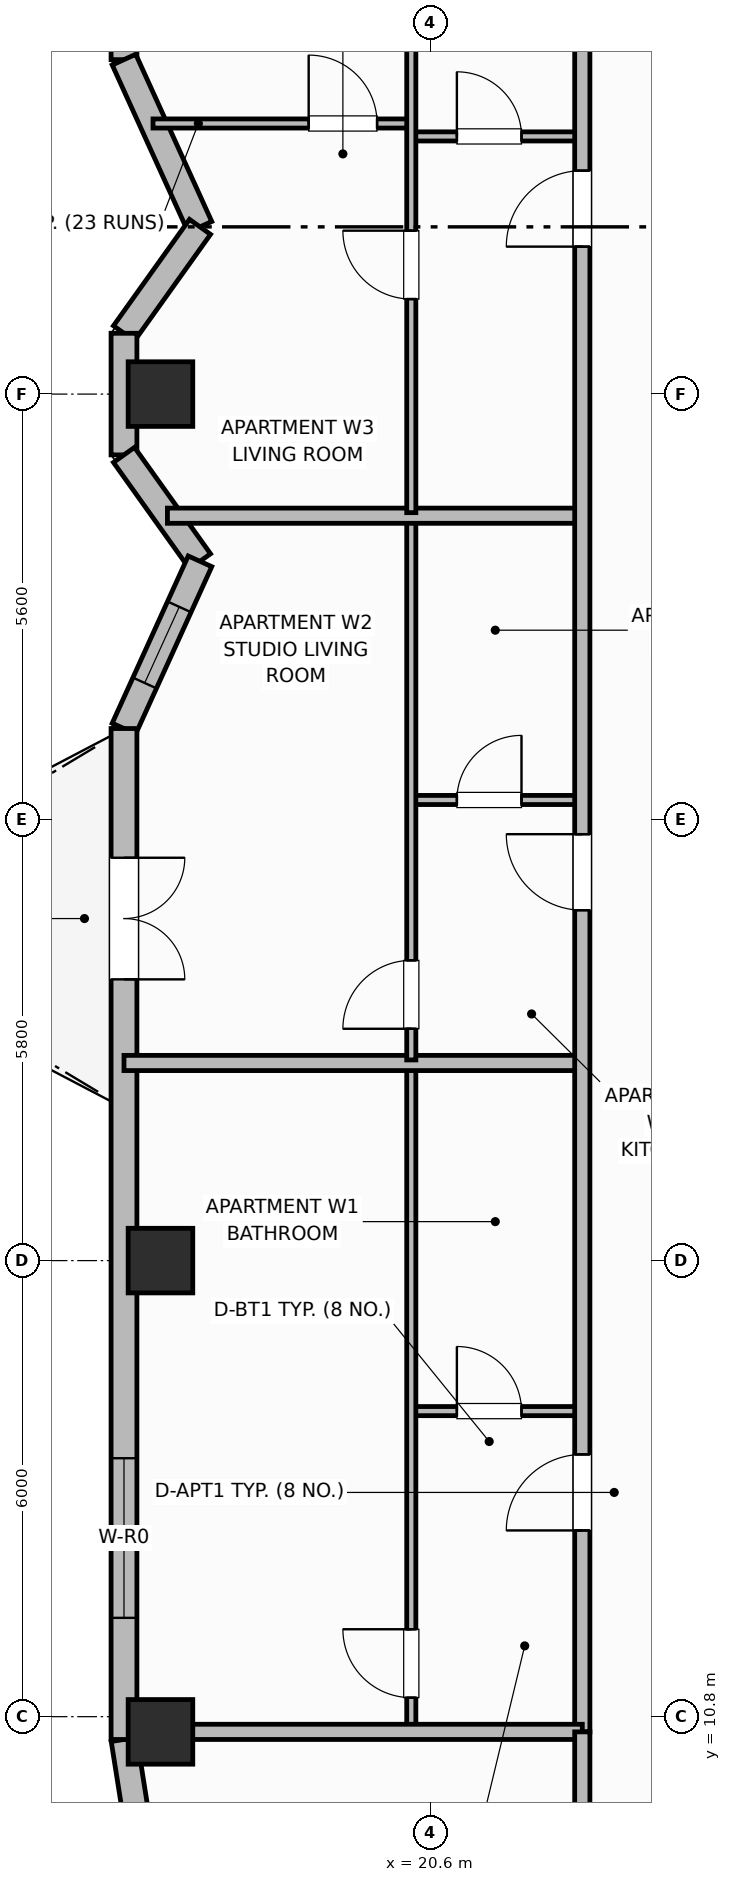
"""IFC4 building model, lengths in metres.
Left out: names, types, materials, properties, quantities, classifications, styles, units other than length and angle.
Written with IfcOpenShell. Run it as: python <this file> out.ifc"""

import sys

from ifc_helpers import new_model, si_unit, direction, frame, frame_2d, origin, origin_2d, place, context, subcontext, project, spatial, rectangle, extrude, element, fill, save


model = new_model("IFC4")
c1 = context("Model", 3, precision=1e-05, world=origin(), true_north=direction((0.0, 1.0)))
c2 = subcontext(c1, "Body", "Model", "MODEL_VIEW")
j1 = project(units=[si_unit("LENGTHUNIT", "METRE"), si_unit("PLANEANGLEUNIT", "RADIAN")], contexts=[c1])
p1 = place(None, origin())
s1 = spatial("IfcSite", under=j1, at=p1, CompositionType="ELEMENT")
p2 = place(p1, origin())
s2 = spatial("IfcBuilding", under=s1, at=p2, CompositionType="ELEMENT")
p3 = place(p2, frame((0.0, 0.0, 218.4)))
s3 = spatial("IfcBuildingStorey", under=s2, at=p3, CompositionType="ELEMENT", Elevation=218.4)
for number, where, z_axis, x_axis in (
    (1, (17.05, 10.6, 0.0), (0.0, 0.0, 1.0), (1.0, 0.0, 0.0)),
    (2, (17.05, 16.8, 0.0), (0.0, 0.0, 1.0), (1.0, 0.0, 0.0)),
    (3, (17.05, 28.2, 0.0), (0.0, 0.0, 1.0), (1.0, 0.0, 0.0)),
):
    element("IfcColumn", number, at=place(p3, frame(where, z_axis=z_axis, x_axis=x_axis)), inside=s3, PredefinedType="COLUMN", context=c2, shape_type="SweptSolid", body=[
        extrude(rectangle(XDim=0.85, YDim=0.85, at=origin_2d()), origin(), (0.0, 0.0, 1.0), 3.7),
    ])
p4 = place(p3, frame((16.57, 10.5, 0.0), z_axis=(0.0, 0.0, 1.0), x_axis=(0.156514556949, -0.987675651954, 0.0)))
e4 = element("IfcWall", 4, at=p4, inside=s3, PredefinedType="SOLIDWALL", context=c2, shape_type="SweptSolid", body=[
    extrude(rectangle(XDim=1.135, YDim=0.34, at=frame_2d((0.568, 0.0))), origin(), (0.0, 0.0, 1.0), 2.72),
])
p5 = place(p3, frame((16.57, 45.9, 0.0), z_axis=(0.0, 0.0, 1.0), x_axis=(0.0, -1.0, 0.0)))
e5 = element("IfcWall", 5, at=p5, inside=s3, PredefinedType="SOLIDWALL", context=c2, shape_type="SweptSolid", body=[
    extrude(rectangle(XDim=13.3, YDim=0.34, at=frame_2d((6.65, 0.0))), origin(), (0.0, 0.0, 1.0), 2.72),
])
p6 = place(p5, frame((1.6, 0.0, 0.95)))
e6 = element("IfcOpeningElement", 6, at=p6, cuts=e5, PredefinedType="OPENING", context=c2, shape_type="SweptSolid", body=[
    extrude(rectangle(XDim=1.1, YDim=1.65, at=frame_2d((0.55, 0.825))), frame((0.0, 0.18, 0.0), z_axis=(0.0, -1.0, 0.0), x_axis=(1.0, 0.0, 0.0)), (0.0, 0.0, 1.0), 0.36),
])
p7 = place(p5, frame((3.9, 0.0, 0.95)))
e7 = element("IfcOpeningElement", 7, at=p7, cuts=e5, PredefinedType="OPENING", context=c2, shape_type="SweptSolid", body=[
    extrude(rectangle(XDim=1.1, YDim=1.65, at=frame_2d((0.55, 0.825))), frame((0.0, 0.18, 0.0), z_axis=(0.0, -1.0, 0.0), x_axis=(1.0, 0.0, 0.0)), (0.0, 0.0, 1.0), 0.36),
])
p8 = place(p5, frame((10.6, 0.0, 0.95)))
e8 = element("IfcOpeningElement", 8, at=p8, cuts=e5, PredefinedType="OPENING", context=c2, shape_type="SweptSolid", body=[
    extrude(rectangle(XDim=1.1, YDim=1.65, at=frame_2d((0.55, 0.825))), frame((0.0, 0.18, 0.0), z_axis=(0.0, -1.0, 0.0), x_axis=(1.0, 0.0, 0.0)), (0.0, 0.0, 1.0), 0.36),
])
p9 = place(p3, frame((16.57, 32.6, 0.0), z_axis=(0.0, 0.0, 1.0), x_axis=(0.413772500085, -0.910380315128, 0.0)))
e9 = element("IfcWall", 9, at=p9, inside=s3, PredefinedType="SOLIDWALL", context=c2, shape_type="SweptSolid", body=[
    extrude(rectangle(XDim=2.417, YDim=0.34, at=frame_2d((1.208, 0.0))), origin(), (0.0, 0.0, 1.0), 2.72),
])
p10 = place(p3, frame((17.57, 30.4, 0.0), z_axis=(0.0, 0.0, 1.0), x_axis=(-0.581265041318, -0.813714293681, 0.0)))
e10 = element("IfcWall", 10, at=p10, inside=s3, PredefinedType="SOLIDWALL", context=c2, shape_type="SweptSolid", body=[
    extrude(rectangle(XDim=1.72, YDim=0.34, at=frame_2d((0.86, 0.0))), origin(), (0.0, 0.0, 1.0), 2.72),
])
p11 = place(p3, frame((16.57, 29.0, 0.0), z_axis=(0.0, 0.0, 1.0), x_axis=(0.0, -1.0, 0.0)))
e11 = element("IfcWall", 11, at=p11, inside=s3, PredefinedType="SOLIDWALL", context=c2, shape_type="SweptSolid", body=[
    extrude(rectangle(XDim=1.6, YDim=0.34, at=frame_2d((0.8, 0.0))), origin(), (0.0, 0.0, 1.0), 2.72),
])
p12 = place(p3, frame((16.57, 27.4, 0.0), z_axis=(0.0, 0.0, 1.0), x_axis=(0.581265041318, -0.813714293681, 0.0)))
e12 = element("IfcWall", 12, at=p12, inside=s3, PredefinedType="SOLIDWALL", context=c2, shape_type="SweptSolid", body=[
    extrude(rectangle(XDim=1.72, YDim=0.34, at=frame_2d((0.86, 0.0))), origin(), (0.0, 0.0, 1.0), 2.72),
])
p13 = place(p3, frame((17.57, 26.0, 0.0), z_axis=(0.0, 0.0, 1.0), x_axis=(-0.413810555983, -0.910363017569, 0.0)))
e13 = element("IfcWall", 13, at=p13, inside=s3, PredefinedType="SOLIDWALL", context=c2, shape_type="SweptSolid", body=[
    extrude(rectangle(XDim=2.417, YDim=0.34, at=frame_2d((1.208, 0.0))), origin(), (0.0, 0.0, 1.0), 2.72),
])
p14 = place(p13, frame((0.658, 0.0, 0.91)))
e14 = element("IfcOpeningElement", 14, at=p14, cuts=e13, PredefinedType="OPENING", context=c2, shape_type="SweptSolid", body=[
    extrude(rectangle(XDim=1.1, YDim=1.65, at=frame_2d((0.55, 0.825))), frame((0.0, 0.18, 0.0), z_axis=(0.0, -1.0, 0.0), x_axis=(1.0, 0.0, 0.0)), (0.0, 0.0, 1.0), 0.36),
])
p15 = place(p3, frame((16.57, 23.8, 0.0), z_axis=(0.0, 0.0, 1.0), x_axis=(0.0, -1.0, 0.0)))
e15 = element("IfcWall", 15, at=p15, inside=s3, PredefinedType="SOLIDWALL", context=c2, shape_type="SweptSolid", body=[
    extrude(rectangle(XDim=13.3, YDim=0.34, at=frame_2d((6.65, 0.0))), origin(), (0.0, 0.0, 1.0), 2.72),
])
p16 = place(p15, frame((1.7, 0.0, 0.0)))
e16 = element("IfcOpeningElement", 16, at=p16, cuts=e15, PredefinedType="OPENING", context=c2, shape_type="SweptSolid", body=[
    extrude(rectangle(XDim=1.6, YDim=2.1, at=frame_2d((0.8, 1.05))), frame((0.0, 0.18, 0.0), z_axis=(0.0, -1.0, 0.0), x_axis=(1.0, 0.0, 0.0)), (0.0, 0.0, 1.0), 0.36),
])
p17 = place(p15, frame((9.6, 0.0, 0.7)))
e17 = element("IfcOpeningElement", 17, at=p17, cuts=e15, PredefinedType="OPENING", context=c2, shape_type="SweptSolid", body=[
    extrude(rectangle(XDim=2.1, YDim=1.9, at=frame_2d((1.05, 0.95))), frame((0.0, 0.18, 0.0), z_axis=(0.0, -1.0, 0.0), x_axis=(1.0, 0.0, 0.0)), (0.0, 0.0, 1.0), 0.36),
])
p18 = place(p3, frame((20.35, 14.82, 0.0), z_axis=(0.0, 0.0, 1.0), x_axis=(1.0, 0.0, 0.0)))
e18 = element("IfcWall", 18, at=p18, inside=s3, PredefinedType="PARTITIONING", context=c2, shape_type="SweptSolid", body=[
    extrude(rectangle(XDim=2.25, YDim=0.12, at=frame_2d((1.125, 0.0))), origin(), (0.0, 0.0, 1.0), 2.55),
])
p19 = place(p18, frame((0.6, 0.0, 0.0)))
e19 = element("IfcOpeningElement", 19, at=p19, cuts=e18, PredefinedType="OPENING", context=c2, shape_type="SweptSolid", body=[
    extrude(rectangle(XDim=0.85, YDim=2.1, at=frame_2d((0.425, 1.05))), frame((0.0, 0.07, 0.0), z_axis=(0.0, -1.0, 0.0), x_axis=(1.0, 0.0, 0.0)), (0.0, 0.0, 1.0), 0.14),
])
p20 = place(p3, frame((20.35, 10.64, 0.0), z_axis=(0.0, 0.0, 1.0), x_axis=(0.0, 1.0, 0.0)))
e20 = element("IfcWall", 20, at=p20, inside=s3, PredefinedType="PARTITIONING", context=c2, shape_type="SweptSolid", body=[
    extrude(rectangle(XDim=8.72, YDim=0.12, at=frame_2d((4.36, 0.0))), origin(), (0.0, 0.0, 1.0), 2.55),
])
p21 = place(p20, frame((0.41, 0.0, 0.0)))
e21 = element("IfcOpeningElement", 21, at=p21, cuts=e20, PredefinedType="OPENING", context=c2, shape_type="SweptSolid", body=[
    extrude(rectangle(XDim=0.9, YDim=2.1, at=frame_2d((0.45, 1.05))), frame((0.0, 0.07, 0.0), z_axis=(0.0, -1.0, 0.0), x_axis=(1.0, 0.0, 0.0)), (0.0, 0.0, 1.0), 0.14),
])
p22 = place(p3, frame((16.57, 19.4, 0.0), z_axis=(0.0, 0.0, 1.0), x_axis=(1.0, 0.0, 0.0)))
e22 = element("IfcWall", 22, at=p22, inside=s3, PredefinedType="PARTITIONING", context=c2, shape_type="SweptSolid", body=[
    extrude(rectangle(XDim=6.03, YDim=0.2, at=frame_2d((3.015, 0.0))), origin(), (0.0, 0.0, 1.0), 2.55),
])
p23 = place(p3, frame((20.35, 22.86, 0.0), z_axis=(0.0, 0.0, 1.0), x_axis=(1.0, 0.0, 0.0)))
e23 = element("IfcWall", 23, at=p23, inside=s3, PredefinedType="PARTITIONING", context=c2, shape_type="SweptSolid", body=[
    extrude(rectangle(XDim=2.25, YDim=0.12, at=frame_2d((1.125, 0.0))), origin(), (0.0, 0.0, 1.0), 2.55),
])
p24 = place(p23, frame((0.6, 0.0, 0.0)))
e24 = element("IfcOpeningElement", 24, at=p24, cuts=e23, PredefinedType="OPENING", context=c2, shape_type="SweptSolid", body=[
    extrude(rectangle(XDim=0.85, YDim=2.1, at=frame_2d((0.425, 1.05))), frame((0.0, 0.07, 0.0), z_axis=(0.0, -1.0, 0.0), x_axis=(1.0, 0.0, 0.0)), (0.0, 0.0, 1.0), 0.14),
])
p25 = place(p3, frame((20.35, 19.44, 0.0), z_axis=(0.0, 0.0, 1.0), x_axis=(0.0, 1.0, 0.0)))
e25 = element("IfcWall", 25, at=p25, inside=s3, PredefinedType="PARTITIONING", context=c2, shape_type="SweptSolid", body=[
    extrude(rectangle(XDim=7.12, YDim=0.12, at=frame_2d((3.56, 0.0))), origin(), (0.0, 0.0, 1.0), 2.55),
])
p26 = place(p25, frame((0.41, 0.0, 0.0)))
e26 = element("IfcOpeningElement", 26, at=p26, cuts=e25, PredefinedType="OPENING", context=c2, shape_type="SweptSolid", body=[
    extrude(rectangle(XDim=0.9, YDim=2.1, at=frame_2d((0.45, 1.05))), frame((0.0, 0.07, 0.0), z_axis=(0.0, -1.0, 0.0), x_axis=(1.0, 0.0, 0.0)), (0.0, 0.0, 1.0), 0.14),
])
p27 = place(p3, frame((17.141, 26.6, 0.0), z_axis=(0.0, 0.0, 1.0), x_axis=(1.0, 0.0, 0.0)))
e27 = element("IfcWall", 27, at=p27, inside=s3, PredefinedType="PARTITIONING", context=c2, shape_type="SweptSolid", body=[
    extrude(rectangle(XDim=5.459, YDim=0.2, at=frame_2d((2.729, 0.0))), origin(), (0.0, 0.0, 1.0), 2.55),
])
p28 = place(p3, frame((20.35, 31.59, 0.0), z_axis=(0.0, 0.0, 1.0), x_axis=(1.0, 0.0, 0.0)))
e28 = element("IfcWall", 28, at=p28, inside=s3, PredefinedType="PARTITIONING", context=c2, shape_type="SweptSolid", body=[
    extrude(rectangle(XDim=2.25, YDim=0.12, at=frame_2d((1.125, 0.0))), origin(), (0.0, 0.0, 1.0), 2.55),
])
p29 = place(p28, frame((0.6, 0.0, 0.0)))
e29 = element("IfcOpeningElement", 29, at=p29, cuts=e28, PredefinedType="OPENING", context=c2, shape_type="SweptSolid", body=[
    extrude(rectangle(XDim=0.85, YDim=2.1, at=frame_2d((0.425, 1.05))), frame((0.0, 0.07, 0.0), z_axis=(0.0, -1.0, 0.0), x_axis=(1.0, 0.0, 0.0)), (0.0, 0.0, 1.0), 0.14),
])
p30 = place(p3, frame((16.952, 31.76, 0.0), z_axis=(0.0, 0.0, 1.0), x_axis=(1.0, 0.0, 0.0)))
e30 = element("IfcWall", 30, at=p30, inside=s3, PredefinedType="PARTITIONING", context=c2, shape_type="SweptSolid", body=[
    extrude(rectangle(XDim=3.398, YDim=0.12, at=frame_2d((1.699, 0.0))), origin(), (0.0, 0.0, 1.0), 2.55),
])
p31 = place(p30, frame((2.048, 0.0, 0.0)))
e31 = element("IfcOpeningElement", 31, at=p31, cuts=e30, PredefinedType="OPENING", context=c2, shape_type="SweptSolid", body=[
    extrude(rectangle(XDim=0.9, YDim=2.1, at=frame_2d((0.45, 1.05))), frame((0.0, 0.07, 0.0), z_axis=(0.0, -1.0, 0.0), x_axis=(1.0, 0.0, 0.0)), (0.0, 0.0, 1.0), 0.14),
])
p32 = place(p3, frame((20.35, 26.64, 0.0), z_axis=(0.0, 0.0, 1.0), x_axis=(0.0, 1.0, 0.0)))
e32 = element("IfcWall", 32, at=p32, inside=s3, PredefinedType="PARTITIONING", context=c2, shape_type="SweptSolid", body=[
    extrude(rectangle(XDim=10.32, YDim=0.12, at=frame_2d((5.16, 0.0))), origin(), (0.0, 0.0, 1.0), 2.55),
])
p33 = place(p32, frame((2.81, 0.0, 0.0)))
e33 = element("IfcOpeningElement", 33, at=p33, cuts=e32, PredefinedType="OPENING", context=c2, shape_type="SweptSolid", body=[
    extrude(rectangle(XDim=0.9, YDim=2.1, at=frame_2d((0.45, 1.05))), frame((0.0, 0.07, 0.0), z_axis=(0.0, -1.0, 0.0), x_axis=(1.0, 0.0, 0.0)), (0.0, 0.0, 1.0), 0.14),
])
p34 = place(p3, frame((22.6, 10.6, 0.0), z_axis=(0.0, 0.0, 1.0), x_axis=(0.0, 1.0, 0.0)))
e34 = element("IfcWall", 34, at=p34, inside=s3, PredefinedType="PARTITIONING", context=c2, shape_type="SweptSolid", body=[
    extrude(rectangle(XDim=35.2, YDim=0.2, at=frame_2d((17.6, 0.0))), origin(), (0.0, 0.0, 1.0), 2.55),
])
p35 = place(p34, frame((2.65, 0.0, 0.0)))
e35 = element("IfcOpeningElement", 35, at=p35, cuts=e34, PredefinedType="OPENING", context=c2, shape_type="SweptSolid", body=[
    extrude(rectangle(XDim=1.0, YDim=2.15, at=frame_2d((0.5, 1.075))), frame((0.0, 0.11, 0.0), z_axis=(0.0, -1.0, 0.0), x_axis=(1.0, 0.0, 0.0)), (0.0, 0.0, 1.0), 0.22),
])
p36 = place(p34, frame((10.81, 0.0, 0.0)))
e36 = element("IfcOpeningElement", 36, at=p36, cuts=e34, PredefinedType="OPENING", context=c2, shape_type="SweptSolid", body=[
    extrude(rectangle(XDim=1.0, YDim=2.15, at=frame_2d((0.5, 1.075))), frame((0.0, 0.11, 0.0), z_axis=(0.0, -1.0, 0.0), x_axis=(1.0, 0.0, 0.0)), (0.0, 0.0, 1.0), 0.22),
])
p37 = place(p34, frame((19.54, 0.0, 0.0)))
e37 = element("IfcOpeningElement", 37, at=p37, cuts=e34, PredefinedType="OPENING", context=c2, shape_type="SweptSolid", body=[
    extrude(rectangle(XDim=1.0, YDim=2.15, at=frame_2d((0.5, 1.075))), frame((0.0, 0.11, 0.0), z_axis=(0.0, -1.0, 0.0), x_axis=(1.0, 0.0, 0.0)), (0.0, 0.0, 1.0), 0.22),
])
p38 = place(p34, frame((26.95, 0.0, 0.0)))
e38 = element("IfcOpeningElement", 38, at=p38, cuts=e34, PredefinedType="OPENING", context=c2, shape_type="SweptSolid", body=[
    extrude(rectangle(XDim=1.0, YDim=2.15, at=frame_2d((0.5, 1.075))), frame((0.0, 0.11, 0.0), z_axis=(0.0, -1.0, 0.0), x_axis=(1.0, 0.0, 0.0)), (0.0, 0.0, 1.0), 0.22),
])
p39 = place(p3, frame((16.99, 10.6, 0.0), z_axis=(0.0, 0.0, 1.0), x_axis=(1.0, 0.0, 0.0)))
e39 = element("IfcWall", 39, at=p39, inside=s3, PredefinedType="PARTITIONING", context=c2, shape_type="SweptSolid", body=[
    extrude(rectangle(XDim=5.61, YDim=0.2, at=frame_2d((2.805, 0.0))), origin(), (0.0, 0.0, 1.0), 2.55),
])
p40 = place(p3, frame((22.6, 6.87, 0.0), z_axis=(0.0, 0.0, 1.0), x_axis=(0.0, 1.0, 0.0)))
e40 = element("IfcWall", 40, at=p40, inside=s3, PredefinedType="PARTITIONING", context=c2, shape_type="SweptSolid", body=[
    extrude(rectangle(XDim=3.73, YDim=0.2, at=frame_2d((1.865, 0.0))), origin(), (0.0, 0.0, 1.0), 2.55),
])
p41 = place(p14, origin())
e41 = element("IfcWindow", 41, at=p41, inside=s3, PartitioningType="SINGLE_PANEL", PredefinedType="WINDOW", context=c2, shape_type="SweptSolid", body=[
    extrude(rectangle(XDim=1.1, YDim=1.65, at=frame_2d((0.55, 0.825))), frame((0.0, 0.03, 0.0), z_axis=(0.0, -1.0, 0.0), x_axis=(1.0, 0.0, 0.0)), (0.0, 0.0, 1.0), 0.06),
])
fill(e14, e41)
p42 = place(p16, origin())
e42 = element("IfcDoor", 42, at=p42, inside=s3, OperationType="DOUBLE_DOOR_SINGLE_SWING", PredefinedType="DOOR", context=c2, shape_type="SweptSolid", body=[
    extrude(rectangle(XDim=1.6, YDim=2.1, at=frame_2d((0.8, 1.05))), frame((0.0, 0.025, 0.0), z_axis=(0.0, -1.0, 0.0), x_axis=(1.0, 0.0, 0.0)), (0.0, 0.0, 1.0), 0.05),
])
fill(e16, e42)
p43 = place(p17, origin())
e43 = element("IfcWindow", 43, at=p43, inside=s3, PartitioningType="SINGLE_PANEL", PredefinedType="WINDOW", context=c2, shape_type="SweptSolid", body=[
    extrude(rectangle(XDim=2.1, YDim=1.9, at=frame_2d((1.05, 0.95))), frame((0.0, 0.03, 0.0), z_axis=(0.0, -1.0, 0.0), x_axis=(1.0, 0.0, 0.0)), (0.0, 0.0, 1.0), 0.06),
])
fill(e17, e43)
p44 = place(p19, origin())
e44 = element("IfcDoor", 44, at=p44, inside=s3, OperationType="SINGLE_SWING_LEFT", PredefinedType="DOOR", context=c2, shape_type="SweptSolid", body=[
    extrude(rectangle(XDim=0.85, YDim=2.1, at=frame_2d((0.425, 1.05))), frame((0.0, 0.025, 0.0), z_axis=(0.0, -1.0, 0.0), x_axis=(1.0, 0.0, 0.0)), (0.0, 0.0, 1.0), 0.05),
])
fill(e19, e44)
p45 = place(p21, origin())
e45 = element("IfcDoor", 45, at=p45, inside=s3, OperationType="SINGLE_SWING_RIGHT", PredefinedType="DOOR", context=c2, shape_type="SweptSolid", body=[
    extrude(rectangle(XDim=0.9, YDim=2.1, at=frame_2d((0.45, 1.05))), frame((0.0, 0.025, 0.0), z_axis=(0.0, -1.0, 0.0), x_axis=(1.0, 0.0, 0.0)), (0.0, 0.0, 1.0), 0.05),
])
fill(e21, e45)
p46 = place(p24, origin())
e46 = element("IfcDoor", 46, at=p46, inside=s3, OperationType="SINGLE_SWING_RIGHT", PredefinedType="DOOR", context=c2, shape_type="SweptSolid", body=[
    extrude(rectangle(XDim=0.85, YDim=2.1, at=frame_2d((0.425, 1.05))), frame((0.0, 0.025, 0.0), z_axis=(0.0, -1.0, 0.0), x_axis=(1.0, 0.0, 0.0)), (0.0, 0.0, 1.0), 0.05),
])
fill(e24, e46)
p47 = place(p26, origin())
e47 = element("IfcDoor", 47, at=p47, inside=s3, OperationType="SINGLE_SWING_LEFT", PredefinedType="DOOR", context=c2, shape_type="SweptSolid", body=[
    extrude(rectangle(XDim=0.9, YDim=2.1, at=frame_2d((0.45, 1.05))), frame((0.0, 0.025, 0.0), z_axis=(0.0, -1.0, 0.0), x_axis=(1.0, 0.0, 0.0)), (0.0, 0.0, 1.0), 0.05),
])
fill(e26, e47)
p48 = place(p29, origin())
e48 = element("IfcDoor", 48, at=p48, inside=s3, OperationType="SINGLE_SWING_LEFT", PredefinedType="DOOR", context=c2, shape_type="SweptSolid", body=[
    extrude(rectangle(XDim=0.85, YDim=2.1, at=frame_2d((0.425, 1.05))), frame((0.0, 0.025, 0.0), z_axis=(0.0, -1.0, 0.0), x_axis=(1.0, 0.0, 0.0)), (0.0, 0.0, 1.0), 0.05),
])
fill(e29, e48)
p49 = place(p31, origin())
e49 = element("IfcDoor", 49, at=p49, inside=s3, OperationType="SINGLE_SWING_LEFT", PredefinedType="DOOR", context=c2, shape_type="SweptSolid", body=[
    extrude(rectangle(XDim=0.9, YDim=2.1, at=frame_2d((0.45, 1.05))), frame((0.0, 0.025, 0.0), z_axis=(0.0, -1.0, 0.0), x_axis=(1.0, 0.0, 0.0)), (0.0, 0.0, 1.0), 0.05),
])
fill(e31, e49)
p50 = place(p33, origin())
e50 = element("IfcDoor", 50, at=p50, inside=s3, OperationType="SINGLE_SWING_RIGHT", PredefinedType="DOOR", context=c2, shape_type="SweptSolid", body=[
    extrude(rectangle(XDim=0.9, YDim=2.1, at=frame_2d((0.45, 1.05))), frame((0.0, 0.025, 0.0), z_axis=(0.0, -1.0, 0.0), x_axis=(1.0, 0.0, 0.0)), (0.0, 0.0, 1.0), 0.05),
])
fill(e33, e50)
p51 = place(p35, origin())
e51 = element("IfcDoor", 51, at=p51, inside=s3, OperationType="SINGLE_SWING_LEFT", PredefinedType="DOOR", context=c2, shape_type="SweptSolid", body=[
    extrude(rectangle(XDim=1.0, YDim=2.15, at=frame_2d((0.5, 1.075))), frame((0.0, 0.025, 0.0), z_axis=(0.0, -1.0, 0.0), x_axis=(1.0, 0.0, 0.0)), (0.0, 0.0, 1.0), 0.05),
])
fill(e35, e51)
p52 = place(p36, origin())
e52 = element("IfcDoor", 52, at=p52, inside=s3, OperationType="SINGLE_SWING_RIGHT", PredefinedType="DOOR", context=c2, shape_type="SweptSolid", body=[
    extrude(rectangle(XDim=1.0, YDim=2.15, at=frame_2d((0.5, 1.075))), frame((0.0, 0.025, 0.0), z_axis=(0.0, -1.0, 0.0), x_axis=(1.0, 0.0, 0.0)), (0.0, 0.0, 1.0), 0.05),
])
fill(e36, e52)
p53 = place(p37, origin())
e53 = element("IfcDoor", 53, at=p53, inside=s3, OperationType="SINGLE_SWING_LEFT", PredefinedType="DOOR", context=c2, shape_type="SweptSolid", body=[
    extrude(rectangle(XDim=1.0, YDim=2.15, at=frame_2d((0.5, 1.075))), frame((0.0, 0.025, 0.0), z_axis=(0.0, -1.0, 0.0), x_axis=(1.0, 0.0, 0.0)), (0.0, 0.0, 1.0), 0.05),
])
fill(e37, e53)
save(model, sys.argv[1])
